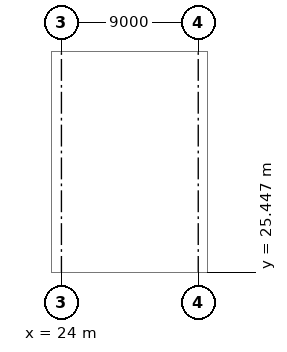
"""IFC4 building model, lengths in metres.
Left out: names, types, materials, properties, quantities, classifications, styles, units other than length and angle.
Written with IfcOpenShell. Run it as: python <this file> out.ifc"""

import sys

from ifc_helpers import new_model, si_unit, direction, frame, origin, origin_2d, place, context, subcontext, project, spatial, rectangle, extrude, element, save


model = new_model("IFC4")
c1 = context("Model", 3, precision=1e-05, world=origin(), true_north=direction((0.0, 1.0)))
c2 = subcontext(c1, "Body", "Model", "MODEL_VIEW")
j1 = project(units=[si_unit("LENGTHUNIT", "METRE"), si_unit("PLANEANGLEUNIT", "RADIAN")], contexts=[c1])
p1 = place(None, origin())
s1 = spatial("IfcSite", under=j1, at=p1, CompositionType="ELEMENT")
p2 = place(p1, origin())
s2 = spatial("IfcBuilding", under=s1, at=p2, CompositionType="ELEMENT")
p3 = place(p2, origin())
s3 = spatial("IfcBuildingStorey", under=s2, at=p3, CompositionType="ELEMENT", Elevation=0.0)
for number, where, z_axis, x_axis in (
    (1, (24.0, 33.7, -0.3), (0.0, 0.0, 1.0), (1.0, 0.0, 0.0)),
    (2, (33.0, 33.7, -0.3), (0.0, 0.0, 1.0), (1.0, 0.0, 0.0)),
):
    element("IfcColumn", number, at=place(p3, frame(where, z_axis=z_axis, x_axis=x_axis)), inside=s3, PredefinedType="COLUMN", context=c2, shape_type="SweptSolid", body=[
        extrude(rectangle(XDim=1.0, YDim=1.4, at=origin_2d()), origin(), (0.0, 0.0, 1.0), 5.3),
    ])
save(model, sys.argv[1])
